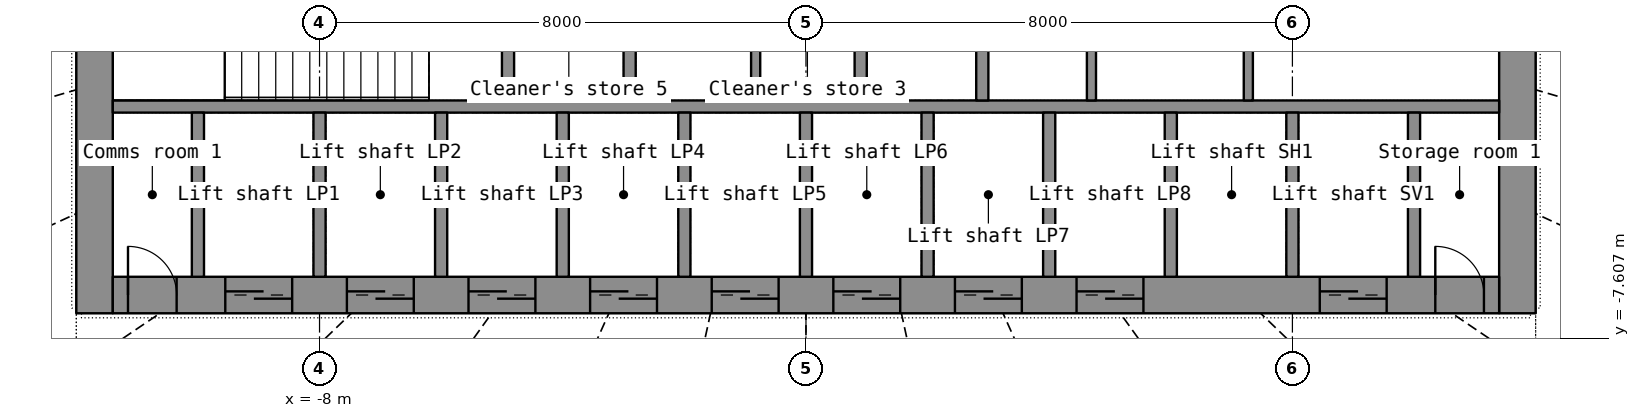
"""IFC4 building model, lengths in metres.
Left out: names, types, materials, properties, quantities, classifications, styles, units other than length and angle.
Written with IfcOpenShell. Run it as: python <this file> out.ifc"""

import sys

from ifc_helpers import new_model, si_unit, direction, frame, frame_2d, origin, place, context, subcontext, project, spatial, rectangle, extrude, element, fill, save


model = new_model("IFC4")
c1 = context("Model", 3, precision=1e-05, world=origin(), true_north=direction((0.0, 1.0)))
c2 = subcontext(c1, "Body", "Model", "MODEL_VIEW")
j1 = project(units=[si_unit("LENGTHUNIT", "METRE"), si_unit("PLANEANGLEUNIT", "RADIAN")], contexts=[c1])
p1 = place(None, origin())
s1 = spatial("IfcSite", under=j1, at=p1, CompositionType="ELEMENT")
p2 = place(p1, origin())
s2 = spatial("IfcBuilding", under=s1, at=p2, CompositionType="ELEMENT")
p3 = place(p2, frame((0.0, 0.0, 92.6)))
s3 = spatial("IfcBuildingStorey", under=s2, at=p3, CompositionType="ELEMENT", Elevation=92.6)
p4 = place(p3, frame((-11.7, -7.2, 0.0), z_axis=(0.0, 0.0, 1.0), x_axis=(0.0, 1.0, 0.0)))
e1 = element("IfcWall", 1, at=p4, inside=s3, PredefinedType="SHEAR", context=c2, shape_type="SweptSolid", body=[
    extrude(rectangle(XDim=14.4, YDim=0.6, at=frame_2d((7.2, 0.0))), origin(), (0.0, 0.0, 1.0), 4.1),
])
p5 = place(p4, frame((6.5, 0.0, 0.0)))
e2 = element("IfcOpeningElement", 2, at=p5, cuts=e1, PredefinedType="OPENING", context=c2, shape_type="SweptSolid", body=[
    extrude(rectangle(XDim=1.4, YDim=2.2, at=frame_2d((0.7, 1.1))), frame((0.0, 0.31, 0.0), z_axis=(0.0, -1.0, 0.0), x_axis=(1.0, 0.0, 0.0)), (0.0, 0.0, 1.0), 0.62),
])
p6 = place(p3, frame((11.7, -7.2, 0.0), z_axis=(0.0, 0.0, 1.0), x_axis=(0.0, 1.0, 0.0)))
e3 = element("IfcWall", 3, at=p6, inside=s3, PredefinedType="SHEAR", context=c2, shape_type="SweptSolid", body=[
    extrude(rectangle(XDim=14.4, YDim=0.6, at=frame_2d((7.2, 0.0))), origin(), (0.0, 0.0, 1.0), 4.1),
])
p7 = place(p6, frame((6.5, 0.0, 0.0)))
e4 = element("IfcOpeningElement", 4, at=p7, cuts=e3, PredefinedType="OPENING", context=c2, shape_type="SweptSolid", body=[
    extrude(rectangle(XDim=1.4, YDim=2.2, at=frame_2d((0.7, 1.1))), frame((0.0, 0.31, 0.0), z_axis=(0.0, -1.0, 0.0), x_axis=(1.0, 0.0, 0.0)), (0.0, 0.0, 1.0), 0.62),
])
p8 = place(p3, frame((-11.4, -6.9, 0.0), z_axis=(0.0, 0.0, 1.0), x_axis=(1.0, 0.0, 0.0)))
e5 = element("IfcWall", 5, at=p8, inside=s3, PredefinedType="SHEAR", context=c2, shape_type="SweptSolid", body=[
    extrude(rectangle(XDim=22.8, YDim=0.6, at=frame_2d((11.4, 0.0))), origin(), (0.0, 0.0, 1.0), 4.1),
])
p9 = place(p8, frame((1.85, 0.0, 0.0)))
e6 = element("IfcOpeningElement", 6, at=p9, cuts=e5, PredefinedType="OPENING", context=c2, shape_type="SweptSolid", body=[
    extrude(rectangle(XDim=1.1, YDim=2.2, at=frame_2d((0.55, 1.1))), frame((0.0, 0.31, 0.0), z_axis=(0.0, -1.0, 0.0), x_axis=(1.0, 0.0, 0.0)), (0.0, 0.0, 1.0), 0.62),
])
p10 = place(p8, frame((3.85, 0.0, 0.0)))
e7 = element("IfcOpeningElement", 7, at=p10, cuts=e5, PredefinedType="OPENING", context=c2, shape_type="SweptSolid", body=[
    extrude(rectangle(XDim=1.1, YDim=2.2, at=frame_2d((0.55, 1.1))), frame((0.0, 0.31, 0.0), z_axis=(0.0, -1.0, 0.0), x_axis=(1.0, 0.0, 0.0)), (0.0, 0.0, 1.0), 0.62),
])
p11 = place(p8, frame((5.85, 0.0, 0.0)))
e8 = element("IfcOpeningElement", 8, at=p11, cuts=e5, PredefinedType="OPENING", context=c2, shape_type="SweptSolid", body=[
    extrude(rectangle(XDim=1.1, YDim=2.2, at=frame_2d((0.55, 1.1))), frame((0.0, 0.31, 0.0), z_axis=(0.0, -1.0, 0.0), x_axis=(1.0, 0.0, 0.0)), (0.0, 0.0, 1.0), 0.62),
])
p12 = place(p8, frame((7.85, 0.0, 0.0)))
e9 = element("IfcOpeningElement", 9, at=p12, cuts=e5, PredefinedType="OPENING", context=c2, shape_type="SweptSolid", body=[
    extrude(rectangle(XDim=1.1, YDim=2.2, at=frame_2d((0.55, 1.1))), frame((0.0, 0.31, 0.0), z_axis=(0.0, -1.0, 0.0), x_axis=(1.0, 0.0, 0.0)), (0.0, 0.0, 1.0), 0.62),
])
p13 = place(p8, frame((9.85, 0.0, 0.0)))
e10 = element("IfcOpeningElement", 10, at=p13, cuts=e5, PredefinedType="OPENING", context=c2, shape_type="SweptSolid", body=[
    extrude(rectangle(XDim=1.1, YDim=2.2, at=frame_2d((0.55, 1.1))), frame((0.0, 0.31, 0.0), z_axis=(0.0, -1.0, 0.0), x_axis=(1.0, 0.0, 0.0)), (0.0, 0.0, 1.0), 0.62),
])
p14 = place(p8, frame((11.85, 0.0, 0.0)))
e11 = element("IfcOpeningElement", 11, at=p14, cuts=e5, PredefinedType="OPENING", context=c2, shape_type="SweptSolid", body=[
    extrude(rectangle(XDim=1.1, YDim=2.2, at=frame_2d((0.55, 1.1))), frame((0.0, 0.31, 0.0), z_axis=(0.0, -1.0, 0.0), x_axis=(1.0, 0.0, 0.0)), (0.0, 0.0, 1.0), 0.62),
])
p15 = place(p8, frame((13.85, 0.0, 0.0)))
e12 = element("IfcOpeningElement", 12, at=p15, cuts=e5, PredefinedType="OPENING", context=c2, shape_type="SweptSolid", body=[
    extrude(rectangle(XDim=1.1, YDim=2.2, at=frame_2d((0.55, 1.1))), frame((0.0, 0.31, 0.0), z_axis=(0.0, -1.0, 0.0), x_axis=(1.0, 0.0, 0.0)), (0.0, 0.0, 1.0), 0.62),
])
p16 = place(p8, frame((15.85, 0.0, 0.0)))
e13 = element("IfcOpeningElement", 13, at=p16, cuts=e5, PredefinedType="OPENING", context=c2, shape_type="SweptSolid", body=[
    extrude(rectangle(XDim=1.1, YDim=2.2, at=frame_2d((0.55, 1.1))), frame((0.0, 0.31, 0.0), z_axis=(0.0, -1.0, 0.0), x_axis=(1.0, 0.0, 0.0)), (0.0, 0.0, 1.0), 0.62),
])
p17 = place(p8, frame((19.85, 0.0, 0.0)))
e14 = element("IfcOpeningElement", 14, at=p17, cuts=e5, PredefinedType="OPENING", context=c2, shape_type="SweptSolid", body=[
    extrude(rectangle(XDim=1.1, YDim=2.2, at=frame_2d((0.55, 1.1))), frame((0.0, 0.31, 0.0), z_axis=(0.0, -1.0, 0.0), x_axis=(1.0, 0.0, 0.0)), (0.0, 0.0, 1.0), 0.62),
])
p18 = place(p8, frame((0.25, 0.0, 0.0)))
e15 = element("IfcOpeningElement", 15, at=p18, cuts=e5, PredefinedType="OPENING", context=c2, shape_type="SweptSolid", body=[
    extrude(rectangle(XDim=0.8, YDim=2.05, at=frame_2d((0.4, 1.025))), frame((0.0, 0.31, 0.0), z_axis=(0.0, -1.0, 0.0), x_axis=(1.0, 0.0, 0.0)), (0.0, 0.0, 1.0), 0.62),
])
p19 = place(p8, frame((21.75, 0.0, 0.0)))
e16 = element("IfcOpeningElement", 16, at=p19, cuts=e5, PredefinedType="OPENING", context=c2, shape_type="SweptSolid", body=[
    extrude(rectangle(XDim=0.8, YDim=2.05, at=frame_2d((0.4, 1.025))), frame((0.0, 0.31, 0.0), z_axis=(0.0, -1.0, 0.0), x_axis=(1.0, 0.0, 0.0)), (0.0, 0.0, 1.0), 0.62),
])
p20 = place(p3, frame((-11.4, -3.8, 0.0), z_axis=(0.0, 0.0, 1.0), x_axis=(1.0, 0.0, 0.0)))
e17 = element("IfcWall", 17, at=p20, inside=s3, PredefinedType="SHEAR", context=c2, shape_type="SweptSolid", body=[
    extrude(rectangle(XDim=22.8, YDim=0.2, at=frame_2d((11.4, 0.0))), origin(), (0.0, 0.0, 1.0), 4.1),
])
for number, where, z_axis, x_axis in (
    (18, (-10.0, -6.6, 0.0), (0.0, 0.0, 1.0), (0.0, 1.0, 0.0)),
    (19, (-8.0, -6.6, 0.0), (0.0, 0.0, 1.0), (0.0, 1.0, 0.0)),
    (20, (-6.0, -6.6, 0.0), (0.0, 0.0, 1.0), (0.0, 1.0, 0.0)),
    (21, (-4.0, -6.6, 0.0), (0.0, 0.0, 1.0), (0.0, 1.0, 0.0)),
    (22, (-2.0, -6.6, 0.0), (0.0, 0.0, 1.0), (0.0, 1.0, 0.0)),
    (23, (0.0, -6.6, 0.0), (0.0, 0.0, 1.0), (0.0, 1.0, 0.0)),
    (24, (2.0, -6.6, 0.0), (0.0, 0.0, 1.0), (0.0, 1.0, 0.0)),
    (25, (4.0, -6.6, 0.0), (0.0, 0.0, 1.0), (0.0, 1.0, 0.0)),
    (26, (6.0, -6.6, 0.0), (0.0, 0.0, 1.0), (0.0, 1.0, 0.0)),
    (27, (8.0, -6.6, 0.0), (0.0, 0.0, 1.0), (0.0, 1.0, 0.0)),
    (28, (10.0, -6.6, 0.0), (0.0, 0.0, 1.0), (0.0, 1.0, 0.0)),
):
    element("IfcWall", number, at=place(p3, frame(where, z_axis=z_axis, x_axis=x_axis)), inside=s3, PredefinedType="SHEAR", context=c2, shape_type="SweptSolid", body=[
        extrude(rectangle(XDim=2.7, YDim=0.2, at=frame_2d((1.35, 0.0))), origin(), (0.0, 0.0, 1.0), 4.1),
    ])
p21 = place(p3, frame((-2.9, -3.7, 0.0), z_axis=(0.0, 0.0, 1.0), x_axis=(0.0, 1.0, 0.0)))
e29 = element("IfcWall", 29, at=p21, inside=s3, PredefinedType="SHEAR", context=c2, shape_type="SweptSolid", body=[
    extrude(rectangle(XDim=7.4, YDim=0.2, at=frame_2d((3.7, 0.0))), origin(), (0.0, 0.0, 1.0), 4.1),
])
p22 = place(p21, frame((3.1, 0.0, 0.0)))
e30 = element("IfcOpeningElement", 30, at=p22, cuts=e29, PredefinedType="OPENING", context=c2, shape_type="SweptSolid", body=[
    extrude(rectangle(XDim=1.2, YDim=2.2, at=frame_2d((0.6, 1.1))), frame((0.0, 0.11, 0.0), z_axis=(0.0, -1.0, 0.0), x_axis=(1.0, 0.0, 0.0)), (0.0, 0.0, 1.0), 0.22),
])
p23 = place(p3, frame((2.9, -3.7, 0.0), z_axis=(0.0, 0.0, 1.0), x_axis=(0.0, 1.0, 0.0)))
e31 = element("IfcWall", 31, at=p23, inside=s3, PredefinedType="SHEAR", context=c2, shape_type="SweptSolid", body=[
    extrude(rectangle(XDim=7.4, YDim=0.2, at=frame_2d((3.7, 0.0))), origin(), (0.0, 0.0, 1.0), 4.1),
])
p24 = place(p23, frame((3.1, 0.0, 0.0)))
e32 = element("IfcOpeningElement", 32, at=p24, cuts=e31, PredefinedType="OPENING", context=c2, shape_type="SweptSolid", body=[
    extrude(rectangle(XDim=1.2, YDim=2.2, at=frame_2d((0.6, 1.1))), frame((0.0, 0.11, 0.0), z_axis=(0.0, -1.0, 0.0), x_axis=(1.0, 0.0, 0.0)), (0.0, 0.0, 1.0), 0.22),
])
for number, where, z_axis, x_axis in (
    (33, (0.9, -3.7, 0.0), (0.0, 0.0, 1.0), (0.0, 1.0, 0.0)),
    (34, (-4.9, -3.7, 0.0), (0.0, 0.0, 1.0), (0.0, 1.0, 0.0)),
):
    element("IfcWall", number, at=place(p3, frame(where, z_axis=z_axis, x_axis=x_axis)), inside=s3, PredefinedType="SHEAR", context=c2, shape_type="SweptSolid", body=[
        extrude(rectangle(XDim=2.35, YDim=0.2, at=frame_2d((1.175, 0.0))), origin(), (0.0, 0.0, 1.0), 4.1),
    ])
for number, where, z_axis, x_axis in (
    (35, (4.695, -3.7, 0.0), (0.0, 0.0, 1.0), (0.0, 1.0, 0.0)),
    (36, (7.275, -3.7, 0.0), (0.0, 0.0, 1.0), (0.0, 1.0, 0.0)),
    (37, (-0.827, -3.7, 0.0), (0.0, 0.0, 1.0), (0.0, 1.0, 0.0)),
):
    element("IfcWall", number, at=place(p3, frame(where, z_axis=z_axis, x_axis=x_axis)), inside=s3, PredefinedType="PARTITIONING", context=c2, shape_type="SweptSolid", body=[
        extrude(rectangle(XDim=2.35, YDim=0.15, at=frame_2d((1.175, 0.0))), origin(), (0.0, 0.0, 1.0), 4.1),
    ])
p25 = place(p9, origin())
e38 = element("IfcDoor", 38, at=p25, inside=s3, OperationType="DOUBLE_DOOR_SLIDING", PredefinedType="DOOR", context=c2, shape_type="SweptSolid", body=[
    extrude(rectangle(XDim=1.1, YDim=2.2, at=frame_2d((0.55, 1.1))), frame((0.0, 0.025, 0.0), z_axis=(0.0, -1.0, 0.0), x_axis=(1.0, 0.0, 0.0)), (0.0, 0.0, 1.0), 0.05),
])
fill(e6, e38)
p26 = place(p10, origin())
e39 = element("IfcDoor", 39, at=p26, inside=s3, OperationType="DOUBLE_DOOR_SLIDING", PredefinedType="DOOR", context=c2, shape_type="SweptSolid", body=[
    extrude(rectangle(XDim=1.1, YDim=2.2, at=frame_2d((0.55, 1.1))), frame((0.0, 0.025, 0.0), z_axis=(0.0, -1.0, 0.0), x_axis=(1.0, 0.0, 0.0)), (0.0, 0.0, 1.0), 0.05),
])
fill(e7, e39)
p27 = place(p11, origin())
e40 = element("IfcDoor", 40, at=p27, inside=s3, OperationType="DOUBLE_DOOR_SLIDING", PredefinedType="DOOR", context=c2, shape_type="SweptSolid", body=[
    extrude(rectangle(XDim=1.1, YDim=2.2, at=frame_2d((0.55, 1.1))), frame((0.0, 0.025, 0.0), z_axis=(0.0, -1.0, 0.0), x_axis=(1.0, 0.0, 0.0)), (0.0, 0.0, 1.0), 0.05),
])
fill(e8, e40)
p28 = place(p12, origin())
e41 = element("IfcDoor", 41, at=p28, inside=s3, OperationType="DOUBLE_DOOR_SLIDING", PredefinedType="DOOR", context=c2, shape_type="SweptSolid", body=[
    extrude(rectangle(XDim=1.1, YDim=2.2, at=frame_2d((0.55, 1.1))), frame((0.0, 0.025, 0.0), z_axis=(0.0, -1.0, 0.0), x_axis=(1.0, 0.0, 0.0)), (0.0, 0.0, 1.0), 0.05),
])
fill(e9, e41)
p29 = place(p13, origin())
e42 = element("IfcDoor", 42, at=p29, inside=s3, OperationType="DOUBLE_DOOR_SLIDING", PredefinedType="DOOR", context=c2, shape_type="SweptSolid", body=[
    extrude(rectangle(XDim=1.1, YDim=2.2, at=frame_2d((0.55, 1.1))), frame((0.0, 0.025, 0.0), z_axis=(0.0, -1.0, 0.0), x_axis=(1.0, 0.0, 0.0)), (0.0, 0.0, 1.0), 0.05),
])
fill(e10, e42)
p30 = place(p14, origin())
e43 = element("IfcDoor", 43, at=p30, inside=s3, OperationType="DOUBLE_DOOR_SLIDING", PredefinedType="DOOR", context=c2, shape_type="SweptSolid", body=[
    extrude(rectangle(XDim=1.1, YDim=2.2, at=frame_2d((0.55, 1.1))), frame((0.0, 0.025, 0.0), z_axis=(0.0, -1.0, 0.0), x_axis=(1.0, 0.0, 0.0)), (0.0, 0.0, 1.0), 0.05),
])
fill(e11, e43)
p31 = place(p15, origin())
e44 = element("IfcDoor", 44, at=p31, inside=s3, OperationType="DOUBLE_DOOR_SLIDING", PredefinedType="DOOR", context=c2, shape_type="SweptSolid", body=[
    extrude(rectangle(XDim=1.1, YDim=2.2, at=frame_2d((0.55, 1.1))), frame((0.0, 0.025, 0.0), z_axis=(0.0, -1.0, 0.0), x_axis=(1.0, 0.0, 0.0)), (0.0, 0.0, 1.0), 0.05),
])
fill(e12, e44)
p32 = place(p16, origin())
e45 = element("IfcDoor", 45, at=p32, inside=s3, OperationType="DOUBLE_DOOR_SLIDING", PredefinedType="DOOR", context=c2, shape_type="SweptSolid", body=[
    extrude(rectangle(XDim=1.1, YDim=2.2, at=frame_2d((0.55, 1.1))), frame((0.0, 0.025, 0.0), z_axis=(0.0, -1.0, 0.0), x_axis=(1.0, 0.0, 0.0)), (0.0, 0.0, 1.0), 0.05),
])
fill(e13, e45)
p33 = place(p17, origin())
e46 = element("IfcDoor", 46, at=p33, inside=s3, OperationType="DOUBLE_DOOR_SLIDING", PredefinedType="DOOR", context=c2, shape_type="SweptSolid", body=[
    extrude(rectangle(XDim=1.1, YDim=2.2, at=frame_2d((0.55, 1.1))), frame((0.0, 0.025, 0.0), z_axis=(0.0, -1.0, 0.0), x_axis=(1.0, 0.0, 0.0)), (0.0, 0.0, 1.0), 0.05),
])
fill(e14, e46)
p34 = place(p18, origin())
e47 = element("IfcDoor", 47, at=p34, inside=s3, OperationType="SINGLE_SWING_LEFT", PredefinedType="DOOR", context=c2, shape_type="SweptSolid", body=[
    extrude(rectangle(XDim=0.8, YDim=2.05, at=frame_2d((0.4, 1.025))), frame((0.0, 0.025, 0.0), z_axis=(0.0, -1.0, 0.0), x_axis=(1.0, 0.0, 0.0)), (0.0, 0.0, 1.0), 0.05),
])
fill(e15, e47)
p35 = place(p19, origin())
e48 = element("IfcDoor", 48, at=p35, inside=s3, OperationType="SINGLE_SWING_LEFT", PredefinedType="DOOR", context=c2, shape_type="SweptSolid", body=[
    extrude(rectangle(XDim=0.8, YDim=2.05, at=frame_2d((0.4, 1.025))), frame((0.0, 0.025, 0.0), z_axis=(0.0, -1.0, 0.0), x_axis=(1.0, 0.0, 0.0)), (0.0, 0.0, 1.0), 0.05),
])
fill(e16, e48)
save(model, sys.argv[1])
